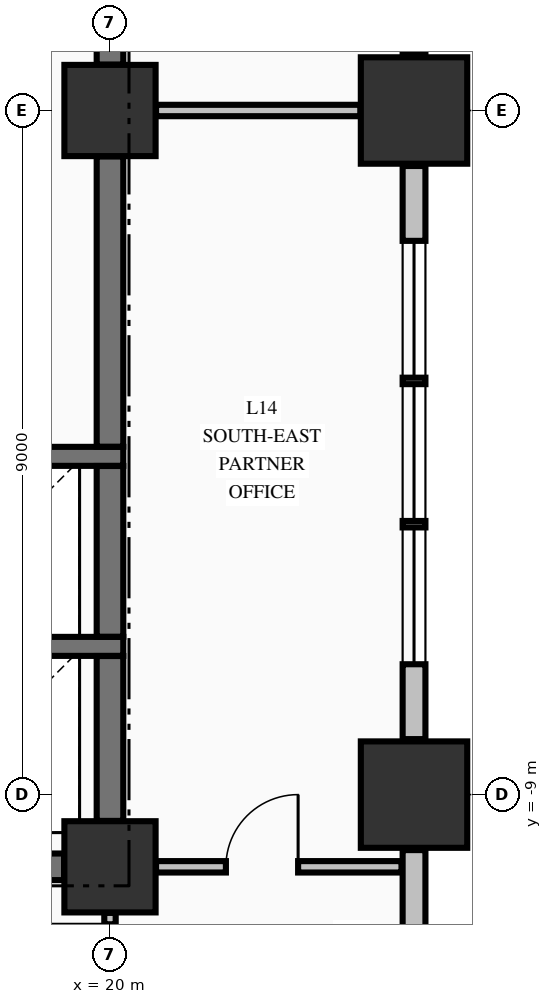
"""IFC4 building model, lengths in metres.
Left out: names, types, materials, properties, quantities, classifications, styles, units other than length and angle.
Written with IfcOpenShell. Run it as: python <this file> out.ifc"""

import sys

from ifc_helpers import new_model, si_unit, direction, frame, frame_2d, origin, origin_2d, place, context, subcontext, project, spatial, rectangle, extrude, element, fill, save


model = new_model("IFC4")
c1 = context("Model", 3, precision=1e-05, world=origin(), true_north=direction((0.0, 1.0)))
c2 = subcontext(c1, "Body", "Model", "MODEL_VIEW")
j1 = project(units=[si_unit("LENGTHUNIT", "METRE"), si_unit("PLANEANGLEUNIT", "RADIAN")], contexts=[c1])
p1 = place(None, origin())
s1 = spatial("IfcSite", under=j1, at=p1, CompositionType="ELEMENT")
p2 = place(p1, origin())
s2 = spatial("IfcBuilding", under=s1, at=p2, CompositionType="ELEMENT")
p3 = place(p2, frame((0.0, 0.0, 60.76)))
s3 = spatial("IfcBuildingStorey", under=s2, at=p3, CompositionType="ELEMENT", Elevation=60.76)
for number, where, z_axis, x_axis in (
    (1, (24.0, -9.0, -0.3), (0.0, 0.0, 1.0), (1.0, 0.0, 0.0)),
    (2, (24.0, 0.0, -0.3), (0.0, 0.0, 1.0), (1.0, 0.0, 0.0)),
):
    element("IfcColumn", number, at=place(p3, frame(where, z_axis=z_axis, x_axis=x_axis)), inside=s3, PredefinedType="COLUMN", context=c2, shape_type="SweptSolid", body=[
        extrude(rectangle(XDim=1.4, YDim=1.4, at=origin_2d()), origin(), (0.0, 0.0, 1.0), 3.62),
    ])
for number, where, z_axis, x_axis in (
    (3, (20.0, -9.95, -0.3), (0.0, 0.0, 1.0), (1.0, 0.0, 0.0)),
    (4, (20.0, 0.0, -0.3), (0.0, 0.0, 1.0), (1.0, 0.0, 0.0)),
):
    element("IfcColumn", number, at=place(p3, frame(where, z_axis=z_axis, x_axis=x_axis)), inside=s3, PredefinedType="COLUMN", context=c2, shape_type="SweptSolid", body=[
        extrude(rectangle(XDim=1.2, YDim=1.2, at=origin_2d()), origin(), (0.0, 0.0, 1.0), 3.62),
    ])
p4 = place(p3, frame((24.0, -22.27, 0.0), z_axis=(0.0, 0.0, 1.0), x_axis=(0.0, 1.0, 0.0)))
e5 = element("IfcWall", 5, at=p4, inside=s3, PredefinedType="STANDARD", context=c2, shape_type="SweptSolid", body=[
    extrude(rectangle(XDim=12.54, YDim=0.3, at=frame_2d((6.27, 0.0))), origin(), (0.0, 0.0, 1.0), 2.712),
])
p5 = place(p3, frame((24.0, -8.27, 0.0), z_axis=(0.0, 0.0, 1.0), x_axis=(0.0, 1.0, 0.0)))
e6 = element("IfcWall", 6, at=p5, inside=s3, PredefinedType="STANDARD", context=c2, shape_type="SweptSolid", body=[
    extrude(rectangle(XDim=7.54, YDim=0.3, at=frame_2d((3.77, 0.0))), origin(), (0.0, 0.0, 1.0), 2.712),
])
p6 = place(p5, frame((0.985, 0.0, 0.78)))
e7 = element("IfcOpeningElement", 7, at=p6, cuts=e6, PredefinedType="OPENING", context=c2, shape_type="SweptSolid", body=[
    extrude(rectangle(XDim=1.8, YDim=1.72, at=frame_2d((0.9, 0.86))), frame((0.0, 0.16, 0.0), z_axis=(0.0, -1.0, 0.0), x_axis=(1.0, 0.0, 0.0)), (0.0, 0.0, 1.0), 0.32),
])
p7 = place(p5, frame((2.87, 0.0, 0.78)))
e8 = element("IfcOpeningElement", 8, at=p7, cuts=e6, PredefinedType="OPENING", context=c2, shape_type="SweptSolid", body=[
    extrude(rectangle(XDim=1.8, YDim=1.72, at=frame_2d((0.9, 0.86))), frame((0.0, 0.16, 0.0), z_axis=(0.0, -1.0, 0.0), x_axis=(1.0, 0.0, 0.0)), (0.0, 0.0, 1.0), 0.32),
])
p8 = place(p5, frame((4.755, 0.0, 0.78)))
e9 = element("IfcOpeningElement", 9, at=p8, cuts=e6, PredefinedType="OPENING", context=c2, shape_type="SweptSolid", body=[
    extrude(rectangle(XDim=1.8, YDim=1.72, at=frame_2d((0.9, 0.86))), frame((0.0, 0.16, 0.0), z_axis=(0.0, -1.0, 0.0), x_axis=(1.0, 0.0, 0.0)), (0.0, 0.0, 1.0), 0.32),
])
p9 = place(p3, frame((24.0, 0.73, 0.0), z_axis=(0.0, 0.0, 1.0), x_axis=(0.0, 1.0, 0.0)))
e10 = element("IfcWall", 10, at=p9, inside=s3, PredefinedType="STANDARD", context=c2, shape_type="SweptSolid", body=[
    extrude(rectangle(XDim=7.54, YDim=0.3, at=frame_2d((3.77, 0.0))), origin(), (0.0, 0.0, 1.0), 2.712),
])
p10 = place(p9, frame((0.985, 0.0, 0.78)))
e11 = element("IfcOpeningElement", 11, at=p10, cuts=e10, PredefinedType="OPENING", context=c2, shape_type="SweptSolid", body=[
    extrude(rectangle(XDim=1.8, YDim=1.72, at=frame_2d((0.9, 0.86))), frame((0.0, 0.16, 0.0), z_axis=(0.0, -1.0, 0.0), x_axis=(1.0, 0.0, 0.0)), (0.0, 0.0, 1.0), 0.32),
])
p11 = place(p9, frame((2.87, 0.0, 0.78)))
e12 = element("IfcOpeningElement", 12, at=p11, cuts=e10, PredefinedType="OPENING", context=c2, shape_type="SweptSolid", body=[
    extrude(rectangle(XDim=1.8, YDim=1.72, at=frame_2d((0.9, 0.86))), frame((0.0, 0.16, 0.0), z_axis=(0.0, -1.0, 0.0), x_axis=(1.0, 0.0, 0.0)), (0.0, 0.0, 1.0), 0.32),
])
p12 = place(p9, frame((4.755, 0.0, 0.78)))
e13 = element("IfcOpeningElement", 13, at=p12, cuts=e10, PredefinedType="OPENING", context=c2, shape_type="SweptSolid", body=[
    extrude(rectangle(XDim=1.8, YDim=1.72, at=frame_2d((0.9, 0.86))), frame((0.0, 0.16, 0.0), z_axis=(0.0, -1.0, 0.0), x_axis=(1.0, 0.0, 0.0)), (0.0, 0.0, 1.0), 0.32),
])
p13 = place(p3, frame((14.7, -9.95, 0.0), z_axis=(0.0, 0.0, 1.0), x_axis=(1.0, 0.0, 0.0)))
e14 = element("IfcWall", 14, at=p13, inside=s3, PredefinedType="SHEAR", context=c2, shape_type="SweptSolid", body=[
    extrude(rectangle(XDim=4.696, YDim=0.35, at=frame_2d((2.348, 0.0))), origin(), (0.0, 0.0, 1.0), 3.32),
])
p14 = place(p13, frame((0.775, 0.0, 0.0)))
e15 = element("IfcOpeningElement", 15, at=p14, cuts=e14, PredefinedType="OPENING", context=c2, shape_type="SweptSolid", body=[
    extrude(rectangle(XDim=0.95, YDim=2.15, at=frame_2d((0.475, 1.075))), frame((0.0, 0.185, 0.0), z_axis=(0.0, -1.0, 0.0), x_axis=(1.0, 0.0, 0.0)), (0.0, 0.0, 1.0), 0.37),
])
for number, where, z_axis, x_axis in (
    (16, (17.025, -7.05, 0.0), (0.0, 0.0, 1.0), (1.0, 0.0, 0.0)),
    (17, (17.025, -4.55, 0.0), (0.0, 0.0, 1.0), (1.0, 0.0, 0.0)),
):
    element("IfcWall", number, at=place(p3, frame(where, z_axis=z_axis, x_axis=x_axis)), inside=s3, PredefinedType="SOLIDWALL", context=c2, shape_type="SweptSolid", body=[
        extrude(rectangle(XDim=3.15, YDim=0.25, at=frame_2d((1.575, 0.0))), origin(), (0.0, 0.0, 1.0), 3.32),
    ])
p15 = place(p3, frame((20.606, -9.95, 0.0), z_axis=(0.0, 0.0, 1.0), x_axis=(1.0, 0.0, 0.0)))
e18 = element("IfcWall", 18, at=p15, inside=s3, PredefinedType="PARTITIONING", context=c2, shape_type="SweptSolid", body=[
    extrude(rectangle(XDim=3.229, YDim=0.15, at=frame_2d((1.615, 0.0))), origin(), (0.0, 0.0, 1.0), 3.32),
])
p16 = place(p15, frame((0.919, 0.0, 0.0)))
e19 = element("IfcOpeningElement", 19, at=p16, cuts=e18, PredefinedType="OPENING", context=c2, shape_type="SweptSolid", body=[
    extrude(rectangle(XDim=0.95, YDim=2.15, at=frame_2d((0.475, 1.075))), frame((0.0, 0.085, 0.0), z_axis=(0.0, -1.0, 0.0), x_axis=(1.0, 0.0, 0.0)), (0.0, 0.0, 1.0), 0.17),
])
p17 = place(p3, frame((20.606, 0.0, 0.0), z_axis=(0.0, 0.0, 1.0), x_axis=(1.0, 0.0, 0.0)))
e20 = element("IfcWall", 20, at=p17, inside=s3, PredefinedType="PARTITIONING", context=c2, shape_type="SweptSolid", body=[
    extrude(rectangle(XDim=2.688, YDim=0.15, at=frame_2d((1.344, 0.0))), origin(), (0.0, 0.0, 1.0), 1.512),
])
p18 = place(p3, frame((20.0, -9.346, 0.0), z_axis=(0.0, 0.0, 1.0), x_axis=(0.0, 1.0, 0.0)))
e21 = element("IfcWall", 21, at=p18, inside=s3, PredefinedType="SHEAR", context=c2, shape_type="SweptSolid", body=[
    extrude(rectangle(XDim=2.169, YDim=0.35, at=frame_2d((1.084, 0.0))), origin(), (0.0, 0.0, 1.0), 3.32),
])
p19 = place(p3, frame((20.0, -6.923, 0.0), z_axis=(0.0, 0.0, 1.0), x_axis=(0.0, 1.0, 0.0)))
e22 = element("IfcWall", 22, at=p19, inside=s3, PredefinedType="SHEAR", context=c2, shape_type="SweptSolid", body=[
    extrude(rectangle(XDim=2.246, YDim=0.35, at=frame_2d((1.123, 0.0))), origin(), (0.0, 0.0, 1.0), 3.32),
])
p20 = place(p3, frame((20.0, -4.423, 0.0), z_axis=(0.0, 0.0, 1.0), x_axis=(0.0, 1.0, 0.0)))
e23 = element("IfcWall", 23, at=p20, inside=s3, PredefinedType="SHEAR", context=c2, shape_type="SweptSolid", body=[
    extrude(rectangle(XDim=3.819, YDim=0.35, at=frame_2d((1.91, 0.0))), origin(), (0.0, 0.0, 1.0), 3.32),
])
p21 = place(p3, frame((20.0, 0.604, 0.0), z_axis=(0.0, 0.0, 1.0), x_axis=(0.0, 1.0, 0.0)))
e24 = element("IfcWall", 24, at=p21, inside=s3, PredefinedType="SHEAR", context=c2, shape_type="SweptSolid", body=[
    extrude(rectangle(XDim=9.292, YDim=0.35, at=frame_2d((4.646, 0.0))), origin(), (0.0, 0.0, 1.0), 3.32),
])
p22 = place(p3, frame((20.0, -12.122, 0.0), z_axis=(0.0, 0.0, 1.0), x_axis=(0.0, 1.0, 0.0)))
e25 = element("IfcWall", 25, at=p22, inside=s3, PredefinedType="PARTITIONING", context=c2, shape_type="SweptSolid", body=[
    extrude(rectangle(XDim=1.566, YDim=0.15, at=frame_2d((0.783, 0.0))), origin(), (0.0, 0.0, 1.0), 3.32),
])
p23 = place(p22, frame((0.466, 0.0, 0.0)))
e26 = element("IfcOpeningElement", 26, at=p23, cuts=e25, PredefinedType="OPENING", context=c2, shape_type="SweptSolid", body=[
    extrude(rectangle(XDim=0.95, YDim=2.15, at=frame_2d((0.475, 1.075))), frame((0.0, 0.085, 0.0), z_axis=(0.0, -1.0, 0.0), x_axis=(1.0, 0.0, 0.0)), (0.0, 0.0, 1.0), 0.17),
])
p24 = place(p6, origin())
e27 = element("IfcWindow", 27, at=p24, inside=s3, PartitioningType="SINGLE_PANEL", PredefinedType="WINDOW", context=c2, shape_type="SweptSolid", body=[
    extrude(rectangle(XDim=1.8, YDim=1.72, at=frame_2d((0.9, 0.86))), frame((0.0, 0.03, 0.0), z_axis=(0.0, -1.0, 0.0), x_axis=(1.0, 0.0, 0.0)), (0.0, 0.0, 1.0), 0.06),
])
fill(e7, e27)
p25 = place(p7, origin())
e28 = element("IfcWindow", 28, at=p25, inside=s3, PartitioningType="SINGLE_PANEL", PredefinedType="WINDOW", context=c2, shape_type="SweptSolid", body=[
    extrude(rectangle(XDim=1.8, YDim=1.72, at=frame_2d((0.9, 0.86))), frame((0.0, 0.03, 0.0), z_axis=(0.0, -1.0, 0.0), x_axis=(1.0, 0.0, 0.0)), (0.0, 0.0, 1.0), 0.06),
])
fill(e8, e28)
p26 = place(p8, origin())
e29 = element("IfcWindow", 29, at=p26, inside=s3, PartitioningType="SINGLE_PANEL", PredefinedType="WINDOW", context=c2, shape_type="SweptSolid", body=[
    extrude(rectangle(XDim=1.8, YDim=1.72, at=frame_2d((0.9, 0.86))), frame((0.0, 0.03, 0.0), z_axis=(0.0, -1.0, 0.0), x_axis=(1.0, 0.0, 0.0)), (0.0, 0.0, 1.0), 0.06),
])
fill(e9, e29)
p27 = place(p23, origin())
e30 = element("IfcDoor", 30, at=p27, inside=s3, OperationType="SINGLE_SWING_RIGHT", PredefinedType="DOOR", context=c2, shape_type="SweptSolid", body=[
    extrude(rectangle(XDim=0.95, YDim=2.15, at=frame_2d((0.475, 1.075))), frame((0.0, 0.025, 0.0), z_axis=(0.0, -1.0, 0.0), x_axis=(1.0, 0.0, 0.0)), (0.0, 0.0, 1.0), 0.05),
])
fill(e26, e30)
p28 = place(p16, origin())
e31 = element("IfcDoor", 31, at=p28, inside=s3, OperationType="SINGLE_SWING_RIGHT", PredefinedType="DOOR", context=c2, shape_type="SweptSolid", body=[
    extrude(rectangle(XDim=0.95, YDim=2.15, at=frame_2d((0.475, 1.075))), frame((0.0, 0.025, 0.0), z_axis=(0.0, -1.0, 0.0), x_axis=(1.0, 0.0, 0.0)), (0.0, 0.0, 1.0), 0.05),
])
fill(e19, e31)
save(model, sys.argv[1])
